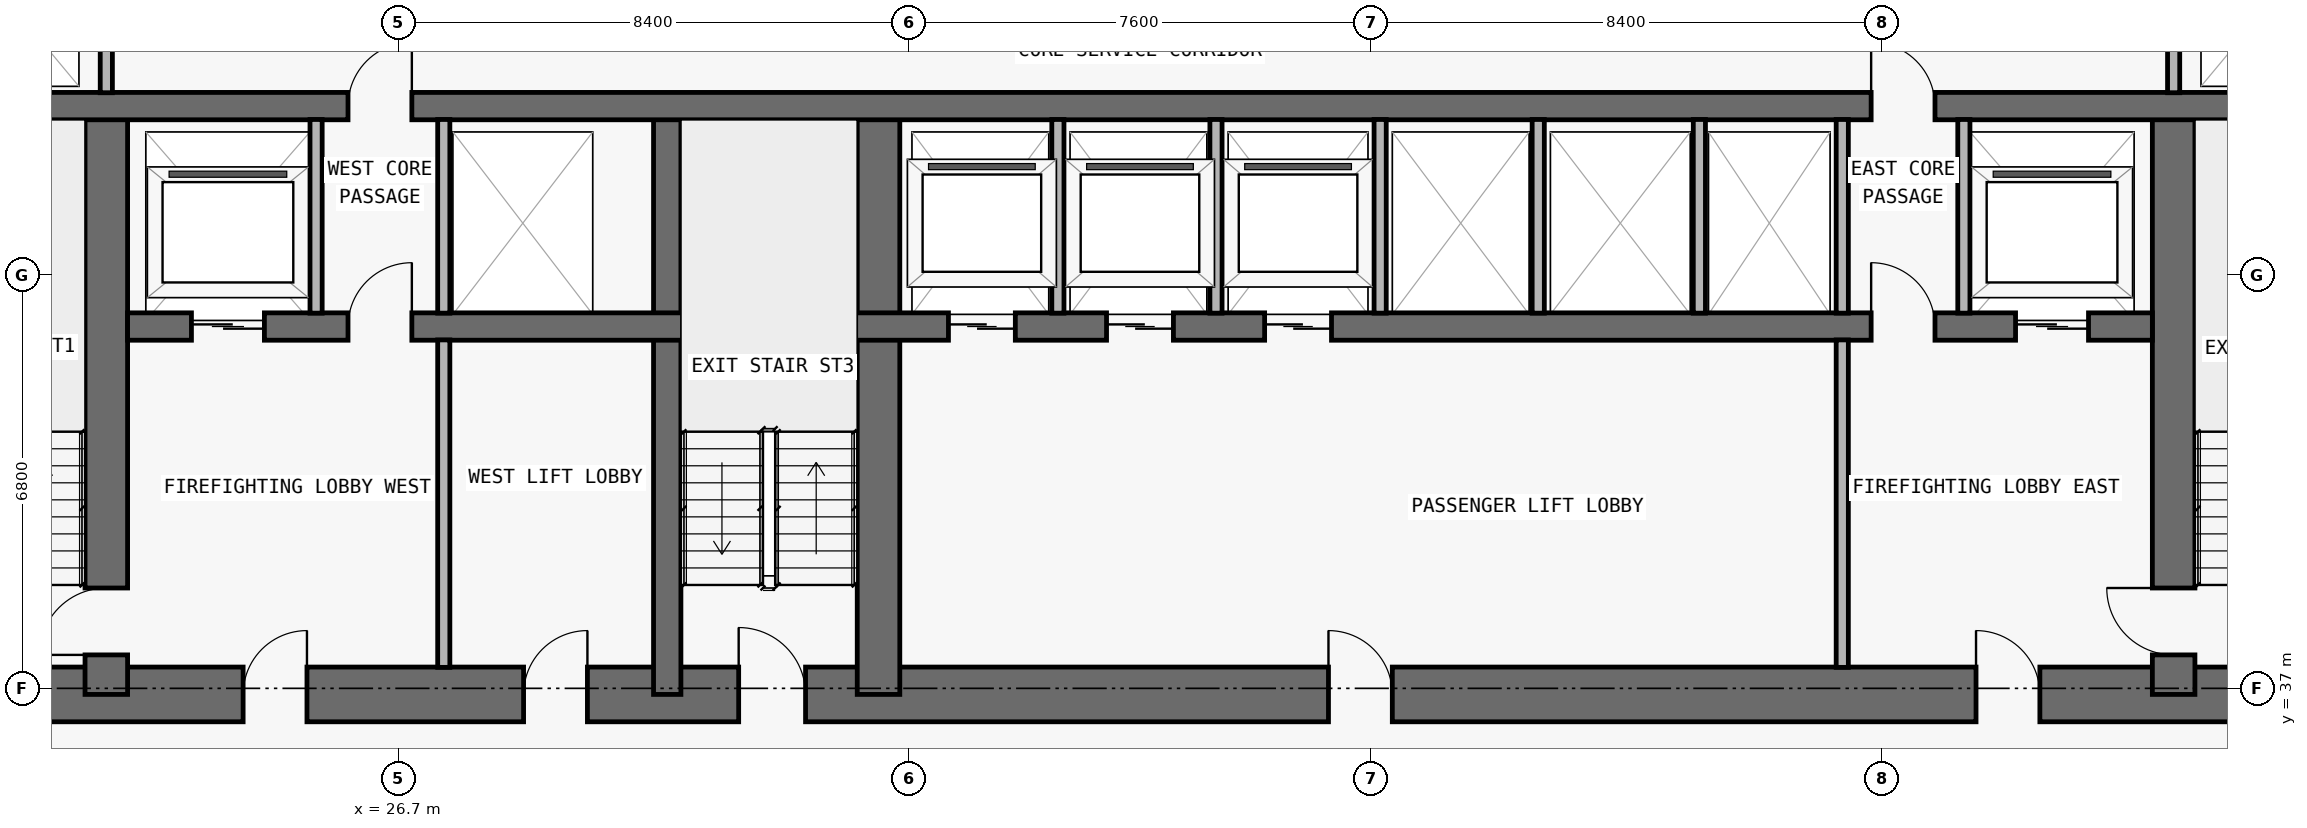
"""IFC4 building model, lengths in metres.
Left out: names, types, materials, properties, quantities, classifications, styles, units other than length and angle.
Written with IfcOpenShell. Run it as: python <this file> out.ifc"""

import sys

from ifc_helpers import new_model, si_unit, direction, frame, frame_2d, origin, place, context, subcontext, project, spatial, rectangle, extrude, element, fill, save


model = new_model("IFC4")
c1 = context("Model", 3, precision=1e-05, world=origin(), true_north=direction((0.0, 1.0)))
c2 = subcontext(c1, "Body", "Model", "MODEL_VIEW")
j1 = project(units=[si_unit("LENGTHUNIT", "METRE"), si_unit("PLANEANGLEUNIT", "RADIAN")], contexts=[c1])
p1 = place(None, origin())
s1 = spatial("IfcSite", under=j1, at=p1, CompositionType="ELEMENT")
p2 = place(p1, origin())
s2 = spatial("IfcBuilding", under=s1, at=p2, CompositionType="ELEMENT")
p3 = place(p2, frame((0.0, 0.0, 69.6)))
s3 = spatial("IfcBuildingStorey", under=s2, at=p3, CompositionType="ELEMENT", Elevation=69.6)
p4 = place(p3, frame((17.75, 36.9, 0.0), z_axis=(0.0, 0.0, 1.0), x_axis=(1.0, 0.0, 0.0)))
e1 = element("IfcWall", 1, at=p4, inside=s3, PredefinedType="SHEAR", context=c2, shape_type="SweptSolid", body=[
    extrude(rectangle(XDim=42.3, YDim=0.9, at=frame_2d((21.15, 0.0))), origin(), (0.0, 0.0, 1.0), 3.05),
])
p5 = place(p4, frame((14.55, 0.0, 0.0)))
e2 = element("IfcOpeningElement", 2, at=p5, cuts=e1, PredefinedType="OPENING", context=c2, shape_type="SweptSolid", body=[
    extrude(rectangle(XDim=1.1, YDim=2.15, at=frame_2d((0.55, 1.075))), frame((0.0, 0.46, 0.0), z_axis=(0.0, -1.0, 0.0), x_axis=(1.0, 0.0, 0.0)), (0.0, 0.0, 1.0), 0.92),
])
p6 = place(p4, frame((6.4, 0.0, 0.0)))
e3 = element("IfcOpeningElement", 3, at=p6, cuts=e1, PredefinedType="OPENING", context=c2, shape_type="SweptSolid", body=[
    extrude(rectangle(XDim=1.05, YDim=2.15, at=frame_2d((0.525, 1.075))), frame((0.0, 0.46, 0.0), z_axis=(0.0, -1.0, 0.0), x_axis=(1.0, 0.0, 0.0)), (0.0, 0.0, 1.0), 0.92),
])
p7 = place(p4, frame((34.9, 0.0, 0.0)))
e4 = element("IfcOpeningElement", 4, at=p7, cuts=e1, PredefinedType="OPENING", context=c2, shape_type="SweptSolid", body=[
    extrude(rectangle(XDim=1.05, YDim=2.15, at=frame_2d((0.525, 1.075))), frame((0.0, 0.46, 0.0), z_axis=(0.0, -1.0, 0.0), x_axis=(1.0, 0.0, 0.0)), (0.0, 0.0, 1.0), 0.92),
])
p8 = place(p4, frame((11.012, 0.0, 0.0)))
e5 = element("IfcOpeningElement", 5, at=p8, cuts=e1, PredefinedType="OPENING", context=c2, shape_type="SweptSolid", body=[
    extrude(rectangle(XDim=1.05, YDim=2.15, at=frame_2d((0.525, 1.075))), frame((0.0, 0.46, 0.0), z_axis=(0.0, -1.0, 0.0), x_axis=(1.0, 0.0, 0.0)), (0.0, 0.0, 1.0), 0.92),
])
p9 = place(p4, frame((24.25, 0.0, 0.0)))
e6 = element("IfcOpeningElement", 6, at=p9, cuts=e1, PredefinedType="OPENING", context=c2, shape_type="SweptSolid", body=[
    extrude(rectangle(XDim=1.05, YDim=2.15, at=frame_2d((0.525, 1.075))), frame((0.0, 0.46, 0.0), z_axis=(0.0, -1.0, 0.0), x_axis=(1.0, 0.0, 0.0)), (0.0, 0.0, 1.0), 0.92),
])
p10 = place(p3, frame((21.9, 36.9, 0.0), z_axis=(0.0, 0.0, 1.0), x_axis=(0.0, 1.0, 0.0)))
e7 = element("IfcWall", 7, at=p10, inside=s3, PredefinedType="SHEAR", context=c2, shape_type="SweptSolid", body=[
    extrude(rectangle(XDim=9.675, YDim=0.7, at=frame_2d((4.837, 0.0))), origin(), (0.0, 0.0, 1.0), 3.05),
])
p11 = place(p10, frame((0.65, 0.0, 0.0)))
e8 = element("IfcOpeningElement", 8, at=p11, cuts=e7, PredefinedType="OPENING", context=c2, shape_type="SweptSolid", body=[
    extrude(rectangle(XDim=1.1, YDim=2.15, at=frame_2d((0.55, 1.075))), frame((0.0, 0.36, 0.0), z_axis=(0.0, -1.0, 0.0), x_axis=(1.0, 0.0, 0.0)), (0.0, 0.0, 1.0), 0.72),
])
p12 = place(p3, frame((55.9, 36.9, 0.0), z_axis=(0.0, 0.0, 1.0), x_axis=(0.0, 1.0, 0.0)))
e9 = element("IfcWall", 9, at=p12, inside=s3, PredefinedType="SHEAR", context=c2, shape_type="SweptSolid", body=[
    extrude(rectangle(XDim=9.675, YDim=0.7, at=frame_2d((4.837, 0.0))), origin(), (0.0, 0.0, 1.0), 3.05),
])
p13 = place(p12, frame((0.65, 0.0, 0.0)))
e10 = element("IfcOpeningElement", 10, at=p13, cuts=e9, PredefinedType="OPENING", context=c2, shape_type="SweptSolid", body=[
    extrude(rectangle(XDim=1.1, YDim=2.15, at=frame_2d((0.55, 1.075))), frame((0.0, 0.36, 0.0), z_axis=(0.0, -1.0, 0.0), x_axis=(1.0, 0.0, 0.0)), (0.0, 0.0, 1.0), 0.72),
])
p14 = place(p3, frame((31.125, 36.9, 0.0), z_axis=(0.0, 0.0, 1.0), x_axis=(0.0, 1.0, 0.0)))
e11 = element("IfcWall", 11, at=p14, inside=s3, PredefinedType="SHEAR", context=c2, shape_type="SweptSolid", body=[
    extrude(rectangle(XDim=9.675, YDim=0.45, at=frame_2d((4.837, 0.0))), origin(), (0.0, 0.0, 1.0), 3.05),
])
p15 = place(p3, frame((34.6, 36.9, 0.0), z_axis=(0.0, 0.0, 1.0), x_axis=(0.0, 1.0, 0.0)))
e12 = element("IfcWall", 12, at=p15, inside=s3, PredefinedType="SHEAR", context=c2, shape_type="SweptSolid", body=[
    extrude(rectangle(XDim=9.675, YDim=0.7, at=frame_2d((4.837, 0.0))), origin(), (0.0, 0.0, 1.0), 3.05),
])
p16 = place(p3, frame((22.25, 42.95, 0.0), z_axis=(0.0, 0.0, 1.0), x_axis=(1.0, 0.0, 0.0)))
e13 = element("IfcWall", 13, at=p16, inside=s3, PredefinedType="SHEAR", context=c2, shape_type="SweptSolid", body=[
    extrude(rectangle(XDim=33.3, YDim=0.45, at=frame_2d((16.65, 0.0))), origin(), (0.0, 0.0, 1.0), 3.05),
])
p17 = place(p16, frame((1.05, 0.0, 0.0)))
e14 = element("IfcOpeningElement", 14, at=p17, cuts=e13, PredefinedType="OPENING", context=c2, shape_type="SweptSolid", body=[
    extrude(rectangle(XDim=1.2, YDim=2.2, at=frame_2d((0.6, 1.1))), frame((0.0, 0.235, 0.0), z_axis=(0.0, -1.0, 0.0), x_axis=(1.0, 0.0, 0.0)), (0.0, 0.0, 1.0), 0.47),
])
p18 = place(p16, frame((31.05, 0.0, 0.0)))
e15 = element("IfcOpeningElement", 15, at=p18, cuts=e13, PredefinedType="OPENING", context=c2, shape_type="SweptSolid", body=[
    extrude(rectangle(XDim=1.2, YDim=2.2, at=frame_2d((0.6, 1.1))), frame((0.0, 0.235, 0.0), z_axis=(0.0, -1.0, 0.0), x_axis=(1.0, 0.0, 0.0)), (0.0, 0.0, 1.0), 0.47),
])
p19 = place(p16, frame((13.5, 0.0, 0.0)))
e16 = element("IfcOpeningElement", 16, at=p19, cuts=e13, PredefinedType="OPENING", context=c2, shape_type="SweptSolid", body=[
    extrude(rectangle(XDim=1.1, YDim=2.2, at=frame_2d((0.55, 1.1))), frame((0.0, 0.235, 0.0), z_axis=(0.0, -1.0, 0.0), x_axis=(1.0, 0.0, 0.0)), (0.0, 0.0, 1.0), 0.47),
])
p20 = place(p16, frame((16.1, 0.0, 0.0)))
e17 = element("IfcOpeningElement", 17, at=p20, cuts=e13, PredefinedType="OPENING", context=c2, shape_type="SweptSolid", body=[
    extrude(rectangle(XDim=1.1, YDim=2.2, at=frame_2d((0.55, 1.1))), frame((0.0, 0.235, 0.0), z_axis=(0.0, -1.0, 0.0), x_axis=(1.0, 0.0, 0.0)), (0.0, 0.0, 1.0), 0.47),
])
p21 = place(p16, frame((18.7, 0.0, 0.0)))
e18 = element("IfcOpeningElement", 18, at=p21, cuts=e13, PredefinedType="OPENING", context=c2, shape_type="SweptSolid", body=[
    extrude(rectangle(XDim=1.1, YDim=2.2, at=frame_2d((0.55, 1.1))), frame((0.0, 0.235, 0.0), z_axis=(0.0, -1.0, 0.0), x_axis=(1.0, 0.0, 0.0)), (0.0, 0.0, 1.0), 0.47),
])
p22 = place(p16, frame((3.625, 0.0, 0.0)))
e19 = element("IfcOpeningElement", 19, at=p22, cuts=e13, PredefinedType="OPENING", context=c2, shape_type="SweptSolid", body=[
    extrude(rectangle(XDim=1.05, YDim=2.15, at=frame_2d((0.525, 1.075))), frame((0.0, 0.235, 0.0), z_axis=(0.0, -1.0, 0.0), x_axis=(1.0, 0.0, 0.0)), (0.0, 0.0, 1.0), 0.47),
])
p23 = place(p16, frame((28.675, 0.0, 0.0)))
e20 = element("IfcOpeningElement", 20, at=p23, cuts=e13, PredefinedType="OPENING", context=c2, shape_type="SweptSolid", body=[
    extrude(rectangle(XDim=1.05, YDim=2.15, at=frame_2d((0.525, 1.075))), frame((0.0, 0.235, 0.0), z_axis=(0.0, -1.0, 0.0), x_axis=(1.0, 0.0, 0.0)), (0.0, 0.0, 1.0), 0.47),
])
p24 = place(p3, frame((18.2, 46.575, 0.0), z_axis=(0.0, 0.0, 1.0), x_axis=(1.0, 0.0, 0.0)))
e21 = element("IfcWall", 21, at=p24, inside=s3, PredefinedType="SHEAR", context=c2, shape_type="SweptSolid", body=[
    extrude(rectangle(XDim=41.4, YDim=0.45, at=frame_2d((20.7, 0.0))), origin(), (0.0, 0.0, 1.0), 3.05),
])
p25 = place(p24, frame((7.675, 0.0, 0.0)))
e22 = element("IfcOpeningElement", 22, at=p25, cuts=e21, PredefinedType="OPENING", context=c2, shape_type="SweptSolid", body=[
    extrude(rectangle(XDim=1.05, YDim=2.15, at=frame_2d((0.525, 1.075))), frame((0.0, 0.235, 0.0), z_axis=(0.0, -1.0, 0.0), x_axis=(1.0, 0.0, 0.0)), (0.0, 0.0, 1.0), 0.47),
])
p26 = place(p24, frame((32.725, 0.0, 0.0)))
e23 = element("IfcOpeningElement", 23, at=p26, cuts=e21, PredefinedType="OPENING", context=c2, shape_type="SweptSolid", body=[
    extrude(rectangle(XDim=1.05, YDim=2.15, at=frame_2d((0.525, 1.075))), frame((0.0, 0.235, 0.0), z_axis=(0.0, -1.0, 0.0), x_axis=(1.0, 0.0, 0.0)), (0.0, 0.0, 1.0), 0.47),
])
p27 = place(p3, frame((21.9, 46.795, 0.0), z_axis=(0.0, 0.0, 1.0), x_axis=(0.0, 1.0, 0.0)))
e24 = element("IfcWall", 24, at=p27, inside=s3, PredefinedType="PARTITIONING", context=c2, shape_type="SweptSolid", body=[
    extrude(rectangle(XDim=3.06, YDim=0.2, at=frame_2d((1.53, 0.0))), origin(), (0.0, 0.0, 1.0), 3.05),
])
p28 = place(p3, frame((25.35, 43.17, 0.0), z_axis=(0.0, 0.0, 1.0), x_axis=(0.0, 1.0, 0.0)))
e25 = element("IfcWall", 25, at=p28, inside=s3, PredefinedType="PARTITIONING", context=c2, shape_type="SweptSolid", body=[
    extrude(rectangle(XDim=3.185, YDim=0.2, at=frame_2d((1.593, 0.0))), origin(), (0.0, 0.0, 1.0), 3.05),
])
p29 = place(p3, frame((27.45, 37.345, 0.0), z_axis=(0.0, 0.0, 1.0), x_axis=(0.0, 1.0, 0.0)))
e26 = element("IfcWall", 26, at=p29, inside=s3, PredefinedType="PARTITIONING", context=c2, shape_type="SweptSolid", body=[
    extrude(rectangle(XDim=5.385, YDim=0.2, at=frame_2d((2.692, 0.0))), origin(), (0.0, 0.0, 1.0), 3.05),
])
for number, where, z_axis, x_axis in (
    (27, (27.45, 43.17, 0.0), (0.0, 0.0, 1.0), (0.0, 1.0, 0.0)),
    (28, (37.55, 43.17, 0.0), (0.0, 0.0, 1.0), (0.0, 1.0, 0.0)),
    (29, (40.15, 43.17, 0.0), (0.0, 0.0, 1.0), (0.0, 1.0, 0.0)),
    (30, (42.85, 43.17, 0.0), (0.0, 0.0, 1.0), (0.0, 1.0, 0.0)),
    (31, (45.45, 43.17, 0.0), (0.0, 0.0, 1.0), (0.0, 1.0, 0.0)),
    (32, (48.1, 43.17, 0.0), (0.0, 0.0, 1.0), (0.0, 1.0, 0.0)),
):
    element("IfcWall", number, at=place(p3, frame(where, z_axis=z_axis, x_axis=x_axis)), inside=s3, PredefinedType="PARTITIONING", context=c2, shape_type="SweptSolid", body=[
        extrude(rectangle(XDim=3.185, YDim=0.2, at=frame_2d((1.593, 0.0))), origin(), (0.0, 0.0, 1.0), 3.05),
    ])
p30 = place(p3, frame((50.45, 37.345, 0.0), z_axis=(0.0, 0.0, 1.0), x_axis=(0.0, 1.0, 0.0)))
e33 = element("IfcWall", 33, at=p30, inside=s3, PredefinedType="PARTITIONING", context=c2, shape_type="SweptSolid", body=[
    extrude(rectangle(XDim=5.385, YDim=0.2, at=frame_2d((2.692, 0.0))), origin(), (0.0, 0.0, 1.0), 3.05),
])
for number, where, z_axis, x_axis in (
    (34, (50.45, 43.17, 0.0), (0.0, 0.0, 1.0), (0.0, 1.0, 0.0)),
    (35, (52.45, 43.17, 0.0), (0.0, 0.0, 1.0), (0.0, 1.0, 0.0)),
):
    element("IfcWall", number, at=place(p3, frame(where, z_axis=z_axis, x_axis=x_axis)), inside=s3, PredefinedType="PARTITIONING", context=c2, shape_type="SweptSolid", body=[
        extrude(rectangle(XDim=3.185, YDim=0.2, at=frame_2d((1.593, 0.0))), origin(), (0.0, 0.0, 1.0), 3.05),
    ])
p31 = place(p3, frame((55.9, 46.795, 0.0), z_axis=(0.0, 0.0, 1.0), x_axis=(0.0, 1.0, 0.0)))
e36 = element("IfcWall", 36, at=p31, inside=s3, PredefinedType="PARTITIONING", context=c2, shape_type="SweptSolid", body=[
    extrude(rectangle(XDim=3.06, YDim=0.2, at=frame_2d((1.53, 0.0))), origin(), (0.0, 0.0, 1.0), 3.05),
])
p32 = place(p17, origin())
e37 = element("IfcDoor", 37, at=p32, inside=s3, OperationType="DOUBLE_DOOR_SLIDING", PredefinedType="DOOR", context=c2, shape_type="SweptSolid", body=[
    extrude(rectangle(XDim=1.2, YDim=2.2, at=frame_2d((0.6, 1.1))), frame((0.0, 0.025, 0.0), z_axis=(0.0, -1.0, 0.0), x_axis=(1.0, 0.0, 0.0)), (0.0, 0.0, 1.0), 0.05),
])
fill(e14, e37)
p33 = place(p18, origin())
e38 = element("IfcDoor", 38, at=p33, inside=s3, OperationType="DOUBLE_DOOR_SLIDING", PredefinedType="DOOR", context=c2, shape_type="SweptSolid", body=[
    extrude(rectangle(XDim=1.2, YDim=2.2, at=frame_2d((0.6, 1.1))), frame((0.0, 0.025, 0.0), z_axis=(0.0, -1.0, 0.0), x_axis=(1.0, 0.0, 0.0)), (0.0, 0.0, 1.0), 0.05),
])
fill(e15, e38)
p34 = place(p19, origin())
e39 = element("IfcDoor", 39, at=p34, inside=s3, OperationType="DOUBLE_DOOR_SLIDING", PredefinedType="DOOR", context=c2, shape_type="SweptSolid", body=[
    extrude(rectangle(XDim=1.1, YDim=2.2, at=frame_2d((0.55, 1.1))), frame((0.0, 0.025, 0.0), z_axis=(0.0, -1.0, 0.0), x_axis=(1.0, 0.0, 0.0)), (0.0, 0.0, 1.0), 0.05),
])
fill(e16, e39)
p35 = place(p20, origin())
e40 = element("IfcDoor", 40, at=p35, inside=s3, OperationType="DOUBLE_DOOR_SLIDING", PredefinedType="DOOR", context=c2, shape_type="SweptSolid", body=[
    extrude(rectangle(XDim=1.1, YDim=2.2, at=frame_2d((0.55, 1.1))), frame((0.0, 0.025, 0.0), z_axis=(0.0, -1.0, 0.0), x_axis=(1.0, 0.0, 0.0)), (0.0, 0.0, 1.0), 0.05),
])
fill(e17, e40)
p36 = place(p21, origin())
e41 = element("IfcDoor", 41, at=p36, inside=s3, OperationType="DOUBLE_DOOR_SLIDING", PredefinedType="DOOR", context=c2, shape_type="SweptSolid", body=[
    extrude(rectangle(XDim=1.1, YDim=2.2, at=frame_2d((0.55, 1.1))), frame((0.0, 0.025, 0.0), z_axis=(0.0, -1.0, 0.0), x_axis=(1.0, 0.0, 0.0)), (0.0, 0.0, 1.0), 0.05),
])
fill(e18, e41)
p37 = place(p5, origin())
e42 = element("IfcDoor", 42, at=p37, inside=s3, OperationType="SINGLE_SWING_LEFT", PredefinedType="DOOR", context=c2, shape_type="SweptSolid", body=[
    extrude(rectangle(XDim=1.1, YDim=2.15, at=frame_2d((0.55, 1.075))), frame((0.0, 0.025, 0.0), z_axis=(0.0, -1.0, 0.0), x_axis=(1.0, 0.0, 0.0)), (0.0, 0.0, 1.0), 0.05),
])
fill(e2, e42)
p38 = place(p6, origin())
e43 = element("IfcDoor", 43, at=p38, inside=s3, OperationType="SINGLE_SWING_RIGHT", PredefinedType="DOOR", context=c2, shape_type="SweptSolid", body=[
    extrude(rectangle(XDim=1.05, YDim=2.15, at=frame_2d((0.525, 1.075))), frame((0.0, 0.025, 0.0), z_axis=(0.0, -1.0, 0.0), x_axis=(1.0, 0.0, 0.0)), (0.0, 0.0, 1.0), 0.05),
])
fill(e3, e43)
p39 = place(p11, origin())
e44 = element("IfcDoor", 44, at=p39, inside=s3, OperationType="SINGLE_SWING_LEFT", PredefinedType="DOOR", context=c2, shape_type="SweptSolid", body=[
    extrude(rectangle(XDim=1.1, YDim=2.15, at=frame_2d((0.55, 1.075))), frame((0.0, 0.025, 0.0), z_axis=(0.0, -1.0, 0.0), x_axis=(1.0, 0.0, 0.0)), (0.0, 0.0, 1.0), 0.05),
])
fill(e8, e44)
p40 = place(p22, origin())
e45 = element("IfcDoor", 45, at=p40, inside=s3, OperationType="SINGLE_SWING_RIGHT", PredefinedType="DOOR", context=c2, shape_type="SweptSolid", body=[
    extrude(rectangle(XDim=1.05, YDim=2.15, at=frame_2d((0.525, 1.075))), frame((0.0, 0.025, 0.0), z_axis=(0.0, -1.0, 0.0), x_axis=(1.0, 0.0, 0.0)), (0.0, 0.0, 1.0), 0.05),
])
fill(e19, e45)
p41 = place(p7, origin())
e46 = element("IfcDoor", 46, at=p41, inside=s3, OperationType="SINGLE_SWING_LEFT", PredefinedType="DOOR", context=c2, shape_type="SweptSolid", body=[
    extrude(rectangle(XDim=1.05, YDim=2.15, at=frame_2d((0.525, 1.075))), frame((0.0, 0.025, 0.0), z_axis=(0.0, -1.0, 0.0), x_axis=(1.0, 0.0, 0.0)), (0.0, 0.0, 1.0), 0.05),
])
fill(e4, e46)
p42 = place(p13, origin())
e47 = element("IfcDoor", 47, at=p42, inside=s3, OperationType="SINGLE_SWING_RIGHT", PredefinedType="DOOR", context=c2, shape_type="SweptSolid", body=[
    extrude(rectangle(XDim=1.1, YDim=2.15, at=frame_2d((0.55, 1.075))), frame((0.0, 0.025, 0.0), z_axis=(0.0, -1.0, 0.0), x_axis=(1.0, 0.0, 0.0)), (0.0, 0.0, 1.0), 0.05),
])
fill(e10, e47)
p43 = place(p23, origin())
e48 = element("IfcDoor", 48, at=p43, inside=s3, OperationType="SINGLE_SWING_LEFT", PredefinedType="DOOR", context=c2, shape_type="SweptSolid", body=[
    extrude(rectangle(XDim=1.05, YDim=2.15, at=frame_2d((0.525, 1.075))), frame((0.0, 0.025, 0.0), z_axis=(0.0, -1.0, 0.0), x_axis=(1.0, 0.0, 0.0)), (0.0, 0.0, 1.0), 0.05),
])
fill(e20, e48)
p44 = place(p8, origin())
e49 = element("IfcDoor", 49, at=p44, inside=s3, OperationType="SINGLE_SWING_RIGHT", PredefinedType="DOOR", context=c2, shape_type="SweptSolid", body=[
    extrude(rectangle(XDim=1.05, YDim=2.15, at=frame_2d((0.525, 1.075))), frame((0.0, 0.025, 0.0), z_axis=(0.0, -1.0, 0.0), x_axis=(1.0, 0.0, 0.0)), (0.0, 0.0, 1.0), 0.05),
])
fill(e5, e49)
p45 = place(p9, origin())
e50 = element("IfcDoor", 50, at=p45, inside=s3, OperationType="SINGLE_SWING_LEFT", PredefinedType="DOOR", context=c2, shape_type="SweptSolid", body=[
    extrude(rectangle(XDim=1.05, YDim=2.15, at=frame_2d((0.525, 1.075))), frame((0.0, 0.025, 0.0), z_axis=(0.0, -1.0, 0.0), x_axis=(1.0, 0.0, 0.0)), (0.0, 0.0, 1.0), 0.05),
])
fill(e6, e50)
p46 = place(p25, origin())
e51 = element("IfcDoor", 51, at=p46, inside=s3, OperationType="SINGLE_SWING_RIGHT", PredefinedType="DOOR", context=c2, shape_type="SweptSolid", body=[
    extrude(rectangle(XDim=1.05, YDim=2.15, at=frame_2d((0.525, 1.075))), frame((0.0, 0.025, 0.0), z_axis=(0.0, -1.0, 0.0), x_axis=(1.0, 0.0, 0.0)), (0.0, 0.0, 1.0), 0.05),
])
fill(e22, e51)
p47 = place(p26, origin())
e52 = element("IfcDoor", 52, at=p47, inside=s3, OperationType="SINGLE_SWING_LEFT", PredefinedType="DOOR", context=c2, shape_type="SweptSolid", body=[
    extrude(rectangle(XDim=1.05, YDim=2.15, at=frame_2d((0.525, 1.075))), frame((0.0, 0.025, 0.0), z_axis=(0.0, -1.0, 0.0), x_axis=(1.0, 0.0, 0.0)), (0.0, 0.0, 1.0), 0.05),
])
fill(e23, e52)
save(model, sys.argv[1])
